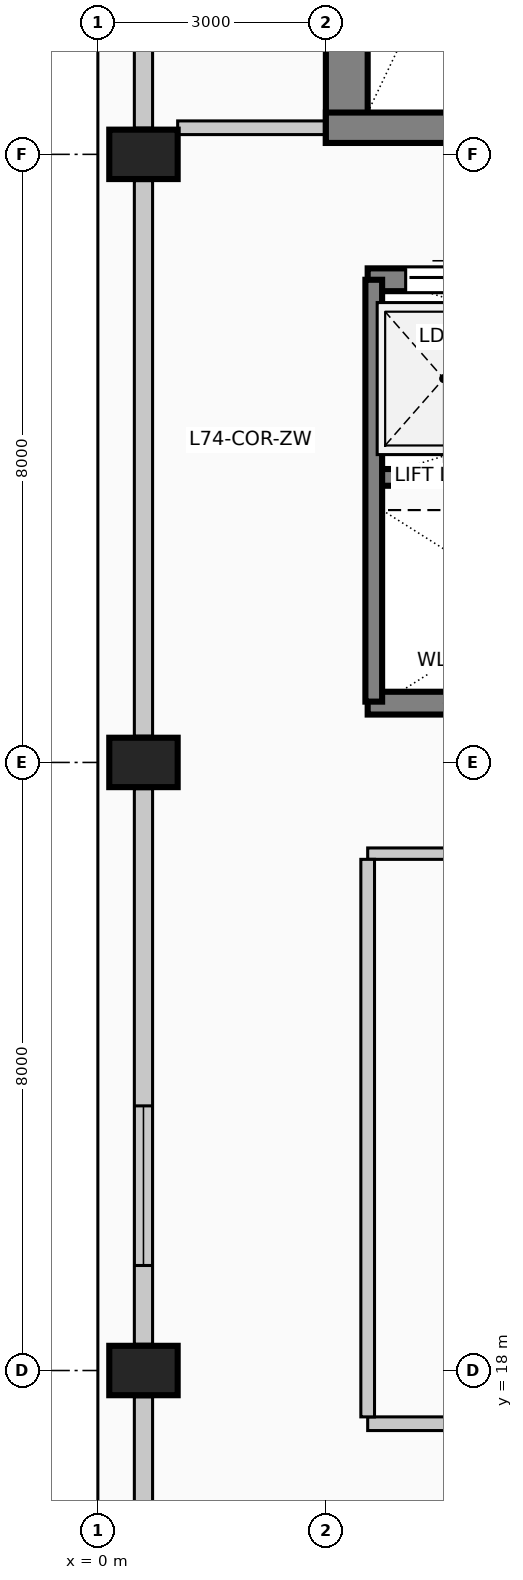
"""IFC4 building model, lengths in metres.
Left out: names, types, materials, properties, quantities, classifications, styles, units other than length and angle.
Written with IfcOpenShell. Run it as: python <this file> out.ifc"""

import sys

from ifc_helpers import new_model, si_unit, direction, frame, frame_2d, origin, origin_2d, place, context, subcontext, project, spatial, rectangle, extrude, element, fill, save


model = new_model("IFC4")
c1 = context("Model", 3, precision=1e-05, world=origin(), true_north=direction((0.0, 1.0)))
c2 = subcontext(c1, "Body", "Model", "MODEL_VIEW")
j1 = project(units=[si_unit("LENGTHUNIT", "METRE"), si_unit("PLANEANGLEUNIT", "RADIAN")], contexts=[c1])
p1 = place(None, origin())
s1 = spatial("IfcSite", under=j1, at=p1, CompositionType="ELEMENT")
p2 = place(p1, origin())
s2 = spatial("IfcBuilding", under=s1, at=p2, CompositionType="ELEMENT")
p3 = place(p2, frame((0.0, 0.0, 305.0)))
s3 = spatial("IfcBuildingStorey", under=s2, at=p3, CompositionType="ELEMENT", Elevation=305.0)
p4 = place(p3, frame((3.275, 34.15, 0.0), z_axis=(0.0, 0.0, 1.0), x_axis=(0.0, 1.0, 0.0)))
e1 = element("IfcWall", 1, at=p4, inside=s3, PredefinedType="SHEAR", context=c2, shape_type="SweptSolid", body=[
    extrude(rectangle(XDim=8.83, YDim=0.55, at=frame_2d((4.415, 0.0))), origin(), (0.0, 0.0, 1.0), 4.0),
])
p5 = place(p3, frame((3.0, 34.35, 0.0), z_axis=(0.0, 0.0, 1.0), x_axis=(1.0, 0.0, 0.0)))
e2 = element("IfcWall", 2, at=p5, inside=s3, PredefinedType="SHEAR", context=c2, shape_type="SweptSolid", body=[
    extrude(rectangle(XDim=4.71, YDim=0.4, at=frame_2d((2.355, 0.0))), origin(), (0.0, 0.0, 1.0), 4.0),
])
p6 = place(p5, frame((2.4, 0.0, 0.0)))
e3 = element("IfcOpeningElement", 3, at=p6, cuts=e2, PredefinedType="OPENING", context=c2, shape_type="SweptSolid", body=[
    extrude(rectangle(XDim=1.15, YDim=2.2, at=frame_2d((0.575, 1.1))), frame((0.0, 0.21, 0.0), z_axis=(0.0, -1.0, 0.0), x_axis=(1.0, 0.0, 0.0)), (0.0, 0.0, 1.0), 0.42),
])
for number, where, z_axis, x_axis in (
    (4, (0.6, 18.0, 0.0), (0.0, 0.0, 1.0), (0.0, 1.0, 0.0)),
    (5, (0.6, 26.0, 0.0), (0.0, 0.0, 1.0), (0.0, 1.0, 0.0)),
    (6, (0.6, 34.0, 0.0), (0.0, 0.0, 1.0), (0.0, 1.0, 0.0)),
):
    element("IfcColumn", number, at=place(p3, frame(where, z_axis=z_axis, x_axis=x_axis)), inside=s3, PredefinedType="COLUMN", context=c2, shape_type="SweptSolid", body=[
        extrude(rectangle(XDim=0.65, YDim=0.9, at=origin_2d()), origin(), (0.0, 0.0, 1.0), 4.0),
    ])
p7 = place(p3, frame((0.6, 10.345, 0.0), z_axis=(0.0, 0.0, 1.0), x_axis=(0.0, 1.0, 0.0)))
e7 = element("IfcWall", 7, at=p7, inside=s3, PredefinedType="SOLIDWALL", context=c2, shape_type="SweptSolid", body=[
    extrude(rectangle(XDim=7.31, YDim=0.24, at=frame_2d((3.655, 0.0))), origin(), (0.0, 0.0, 1.0), 3.025),
])
p8 = place(p7, frame((1.037, 0.0, 0.35)))
e8 = element("IfcOpeningElement", 8, at=p8, cuts=e7, PredefinedType="OPENING", context=c2, shape_type="SweptSolid", body=[
    extrude(rectangle(XDim=2.1, YDim=2.2, at=frame_2d((1.05, 1.1))), frame((0.0, 0.13, 0.0), z_axis=(0.0, -1.0, 0.0), x_axis=(1.0, 0.0, 0.0)), (0.0, 0.0, 1.0), 0.26),
])
p9 = place(p3, frame((0.6, 18.345, 0.0), z_axis=(0.0, 0.0, 1.0), x_axis=(0.0, 1.0, 0.0)))
e9 = element("IfcWall", 9, at=p9, inside=s3, PredefinedType="SOLIDWALL", context=c2, shape_type="SweptSolid", body=[
    extrude(rectangle(XDim=7.31, YDim=0.24, at=frame_2d((3.655, 0.0))), origin(), (0.0, 0.0, 1.0), 3.025),
])
p10 = place(p9, frame((1.037, 0.0, 0.35)))
e10 = element("IfcOpeningElement", 10, at=p10, cuts=e9, PredefinedType="OPENING", context=c2, shape_type="SweptSolid", body=[
    extrude(rectangle(XDim=2.1, YDim=2.2, at=frame_2d((1.05, 1.1))), frame((0.0, 0.13, 0.0), z_axis=(0.0, -1.0, 0.0), x_axis=(1.0, 0.0, 0.0)), (0.0, 0.0, 1.0), 0.26),
])
p11 = place(p3, frame((0.6, 26.345, 0.0), z_axis=(0.0, 0.0, 1.0), x_axis=(0.0, 1.0, 0.0)))
e11 = element("IfcWall", 11, at=p11, inside=s3, PredefinedType="SOLIDWALL", context=c2, shape_type="SweptSolid", body=[
    extrude(rectangle(XDim=7.31, YDim=0.24, at=frame_2d((3.655, 0.0))), origin(), (0.0, 0.0, 1.0), 3.025),
])
p12 = place(p3, frame((0.6, 34.345, 0.0), z_axis=(0.0, 0.0, 1.0), x_axis=(0.0, 1.0, 0.0)))
e12 = element("IfcWall", 12, at=p12, inside=s3, PredefinedType="SOLIDWALL", context=c2, shape_type="SweptSolid", body=[
    extrude(rectangle(XDim=7.71, YDim=0.24, at=frame_2d((3.855, 0.0))), origin(), (0.0, 0.0, 1.0), 3.025),
])
p13 = place(p3, frame((3.55, 32.35, 0.0), z_axis=(0.0, 0.0, 1.0), x_axis=(1.0, 0.0, 0.0)))
e13 = element("IfcWall", 13, at=p13, inside=s3, PredefinedType="SOLIDWALL", context=c2, shape_type="SweptSolid", body=[
    extrude(rectangle(XDim=2.1, YDim=0.3, at=frame_2d((1.05, 0.0))), origin(), (0.0, 0.0, 1.0), 4.0),
])
p14 = place(p13, frame((0.5, 0.0, 0.0)))
e14 = element("IfcOpeningElement", 14, at=p14, cuts=e13, PredefinedType="OPENING", context=c2, shape_type="SweptSolid", body=[
    extrude(rectangle(XDim=1.1, YDim=2.2, at=frame_2d((0.55, 1.1))), frame((0.0, 0.16, 0.0), z_axis=(0.0, -1.0, 0.0), x_axis=(1.0, 0.0, 0.0)), (0.0, 0.0, 1.0), 0.32),
])
p15 = place(p3, frame((5.65, 26.78, 0.0), z_axis=(0.0, 0.0, 1.0), x_axis=(-1.0, 0.0, 0.0)))
e15 = element("IfcWall", 15, at=p15, inside=s3, PredefinedType="SOLIDWALL", context=c2, shape_type="SweptSolid", body=[
    extrude(rectangle(XDim=2.1, YDim=0.3, at=frame_2d((1.05, 0.0))), origin(), (0.0, 0.0, 1.0), 4.0),
])
p16 = place(p3, frame((3.55, 29.75, 0.0), z_axis=(0.0, 0.0, 1.0), x_axis=(1.0, 0.0, 0.0)))
e16 = element("IfcWall", 16, at=p16, inside=s3, PredefinedType="SOLIDWALL", context=c2, shape_type="SweptSolid", body=[
    extrude(rectangle(XDim=8.65, YDim=0.22, at=frame_2d((4.325, 0.0))), origin(), (0.0, 0.0, 1.0), 4.0),
])
p17 = place(p3, frame((3.63, 26.8, 0.0), z_axis=(0.0, 0.0, 1.0), x_axis=(0.0, 1.0, 0.0)))
e17 = element("IfcWall", 17, at=p17, inside=s3, PredefinedType="SOLIDWALL", context=c2, shape_type="SweptSolid", body=[
    extrude(rectangle(XDim=5.55, YDim=0.22, at=frame_2d((2.775, 0.0))), origin(), (0.0, 0.0, 1.0), 4.0),
])
p18 = place(p3, frame((3.55, 17.3, 0.0), z_axis=(0.0, 0.0, 1.0), x_axis=(1.0, 0.0, 0.0)))
e18 = element("IfcWall", 18, at=p18, inside=s3, PredefinedType="PARTITIONING", context=c2, shape_type="SweptSolid", body=[
    extrude(rectangle(XDim=6.25, YDim=0.18, at=frame_2d((3.125, 0.0))), origin(), (0.0, 0.0, 1.0), 3.775),
])
p19 = place(p18, frame((2.6, 0.0, 0.0)))
e19 = element("IfcOpeningElement", 19, at=p19, cuts=e18, PredefinedType="OPENING", context=c2, shape_type="SweptSolid", body=[
    extrude(rectangle(XDim=1.05, YDim=2.15, at=frame_2d((0.525, 1.075))), frame((0.0, 0.1, 0.0), z_axis=(0.0, -1.0, 0.0), x_axis=(1.0, 0.0, 0.0)), (0.0, 0.0, 1.0), 0.2),
])
p20 = place(p3, frame((3.55, 24.8, 0.0), z_axis=(0.0, 0.0, 1.0), x_axis=(1.0, 0.0, 0.0)))
e20 = element("IfcWall", 20, at=p20, inside=s3, PredefinedType="PARTITIONING", context=c2, shape_type="SweptSolid", body=[
    extrude(rectangle(XDim=6.25, YDim=0.15, at=frame_2d((3.125, 0.0))), origin(), (0.0, 0.0, 1.0), 3.775),
])
p21 = place(p3, frame((1.05, 34.35, 0.0), z_axis=(0.0, 0.0, 1.0), x_axis=(1.0, 0.0, 0.0)))
e21 = element("IfcWall", 21, at=p21, inside=s3, PredefinedType="PARTITIONING", context=c2, shape_type="SweptSolid", body=[
    extrude(rectangle(XDim=1.95, YDim=0.18, at=frame_2d((0.975, 0.0))), origin(), (0.0, 0.0, 1.0), 3.775),
])
p22 = place(p3, frame((3.55, 17.39, 0.0), z_axis=(0.0, 0.0, 1.0), x_axis=(0.0, 1.0, 0.0)))
e22 = element("IfcWall", 22, at=p22, inside=s3, PredefinedType="PARTITIONING", context=c2, shape_type="SweptSolid", body=[
    extrude(rectangle(XDim=7.335, YDim=0.18, at=frame_2d((3.667, 0.0))), origin(), (0.0, 0.0, 1.0), 3.775),
])
p23 = place(p10, origin())
e23 = element("IfcWindow", 23, at=p23, inside=s3, PartitioningType="SINGLE_PANEL", PredefinedType="WINDOW", context=c2, shape_type="SweptSolid", body=[
    extrude(rectangle(XDim=2.1, YDim=2.2, at=frame_2d((1.05, 1.1))), frame((0.0, 0.03, 0.0), z_axis=(0.0, -1.0, 0.0), x_axis=(1.0, 0.0, 0.0)), (0.0, 0.0, 1.0), 0.06),
])
fill(e10, e23)
p24 = place(p14, origin())
e24 = element("IfcDoor", 24, at=p24, inside=s3, OperationType="SLIDING_TO_LEFT", PredefinedType="DOOR", context=c2, shape_type="SweptSolid", body=[
    extrude(rectangle(XDim=1.1, YDim=2.2, at=frame_2d((0.55, 1.1))), frame((0.0, 0.025, 0.0), z_axis=(0.0, -1.0, 0.0), x_axis=(1.0, 0.0, 0.0)), (0.0, 0.0, 1.0), 0.05),
])
fill(e14, e24)
save(model, sys.argv[1])
